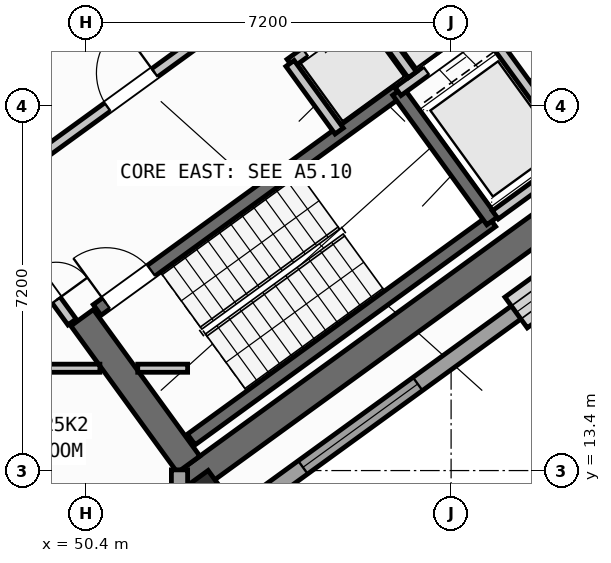
"""IFC4 building model, lengths in metres.
Left out: names, types, materials, properties, quantities, classifications, styles, units other than length and angle.
Written with IfcOpenShell. Run it as: python <this file> out.ifc"""

import sys

from ifc_helpers import new_model, si_unit, direction, frame, frame_2d, origin, origin_2d, place, context, subcontext, project, spatial, rectangle, hollow_rectangle, extrude, source, transform, mapped, element, fill, save


model = new_model("IFC4")
c1 = context("Model", 3, precision=1e-05, world=origin(), true_north=direction((0.0, 1.0)))
c2 = subcontext(c1, "Body", "Model", "MODEL_VIEW")
j1 = project(units=[si_unit("LENGTHUNIT", "METRE"), si_unit("PLANEANGLEUNIT", "RADIAN")], contexts=[c1])
p1 = place(None, origin())
s1 = spatial("IfcSite", under=j1, at=p1, CompositionType="ELEMENT")
p2 = place(p1, origin())
s2 = spatial("IfcBuilding", under=s1, at=p2, CompositionType="ELEMENT")
p3 = place(p2, frame((0.0, 0.0, 100.8)))
s3 = spatial("IfcBuildingStorey", under=s2, at=p3, CompositionType="ELEMENT", Elevation=100.8)
p4 = place(p3, frame((52.359, 13.14, 0.0), z_axis=(0.0, 0.0, 1.0), x_axis=(0.809014896919, 0.587788139183, 0.0)))
e1 = element("IfcWall", 1, at=p4, inside=s3, PredefinedType="SHEAR", context=c2, shape_type="SweptSolid", body=[
    extrude(rectangle(XDim=12.34, YDim=0.55, at=frame_2d((6.17, 0.0))), origin(), (0.0, 0.0, 1.0), 4.25),
])
p5 = place(p3, frame((52.42, 13.524, 0.0), z_axis=(0.0, 0.0, 1.0), x_axis=(-0.587802113096, 0.809004744015, 0.0)))
e2 = element("IfcWall", 2, at=p5, inside=s3, PredefinedType="SHEAR", context=c2, shape_type="SweptSolid", body=[
    extrude(rectangle(XDim=3.575, YDim=0.55, at=frame_2d((1.788, 0.0))), origin(), (0.0, 0.0, 1.0), 4.25),
])
m1 = source(origin(), c2, "Body", "SweptSolid", [
    extrude(hollow_rectangle(XDim=0.9, YDim=0.9, WallThickness=0.036, at=origin_2d()), origin(), (0.0, 0.0, 1.0), 4.5),
])
p6 = place(p3, frame((52.705, 12.773, 0.0), z_axis=(0.0, 0.0, 1.0), x_axis=(0.809016994375, 0.587785252292, 0.0)))
e3 = element("IfcColumn", 3, at=p6, inside=s3, PredefinedType="COLUMN", context=c2, shape_type="MappedRepresentation", body=[
    mapped(m1, transform((0.0, 0.0, 0.0), scale=1.0)),
])
p7 = place(p3, frame((67.454, 22.747, 0.0), z_axis=(0.0, 0.0, 1.0), x_axis=(-0.809021120468, -0.587779573171, 0.0)))
e4 = element("IfcWall", 4, at=p7, inside=s3, PredefinedType="STANDARD", context=c2, shape_type="SweptSolid", body=[
    extrude(rectangle(XDim=17.588, YDim=0.32, at=frame_2d((8.794, 0.0))), origin(), (0.0, 0.0, 1.0), 4.25),
])
p8 = place(p7, frame((1.624, 0.0, 0.0)))
e5 = element("IfcOpeningElement", 5, at=p8, cuts=e4, PredefinedType="OPENING", context=c2, shape_type="SweptSolid", body=[
    extrude(rectangle(XDim=1.05, YDim=2.15, at=frame_2d((0.525, 1.075))), frame((0.0, 0.17, 0.0), z_axis=(0.0, -1.0, 0.0), x_axis=(1.0, 0.0, 0.0)), (0.0, 0.0, 1.0), 0.34),
])
p9 = place(p7, frame((7.794, 0.0, 0.65)))
e6 = element("IfcOpeningElement", 6, at=p9, cuts=e4, PredefinedType="OPENING", context=c2, shape_type="SweptSolid", body=[
    extrude(rectangle(XDim=2.8, YDim=2.1, at=frame_2d((1.4, 1.05))), frame((0.0, 0.17, 0.0), z_axis=(0.0, -1.0, 0.0), x_axis=(1.0, 0.0, 0.0)), (0.0, 0.0, 1.0), 0.34),
])
p10 = place(p7, frame((12.994, 0.0, 0.65)))
e7 = element("IfcOpeningElement", 7, at=p10, cuts=e4, PredefinedType="OPENING", context=c2, shape_type="SweptSolid", body=[
    extrude(rectangle(XDim=2.8, YDim=2.1, at=frame_2d((1.4, 1.05))), frame((0.0, 0.17, 0.0), z_axis=(0.0, -1.0, 0.0), x_axis=(1.0, 0.0, 0.0)), (0.0, 0.0, 1.0), 0.34),
])
p11 = place(p3, frame((52.24, 13.414, 0.0), z_axis=(0.0, 0.0, 1.0), x_axis=(0.0, -1.0, 0.0)))
e8 = element("IfcWall", 8, at=p11, inside=s3, PredefinedType="STANDARD", context=c2, shape_type="SweptSolid", body=[
    extrude(rectangle(XDim=9.948, YDim=0.32, at=frame_2d((4.974, 0.0))), origin(), (0.0, 0.0, 1.0), 4.25),
])
p12 = place(p11, frame((1.96, 0.0, 0.65)))
e9 = element("IfcOpeningElement", 9, at=p12, cuts=e8, PredefinedType="OPENING", context=c2, shape_type="SweptSolid", body=[
    extrude(rectangle(XDim=2.8, YDim=2.1, at=frame_2d((1.4, 1.05))), frame((0.0, 0.17, 0.0), z_axis=(0.0, -1.0, 0.0), x_axis=(1.0, 0.0, 0.0)), (0.0, 0.0, 1.0), 0.34),
])
p13 = place(p11, frame((6.883, 0.0, 0.8)))
e10 = element("IfcOpeningElement", 10, at=p13, cuts=e8, PredefinedType="OPENING", context=c2, shape_type="SweptSolid", body=[
    extrude(rectangle(XDim=2.1, YDim=1.55, at=frame_2d((1.05, 0.775))), frame((0.0, 0.17, 0.0), z_axis=(0.0, -1.0, 0.0), x_axis=(1.0, 0.0, 0.0)), (0.0, 0.0, 1.0), 0.34),
])
p14 = place(p3, frame((52.472, 14.013, 0.0), z_axis=(0.0, 0.0, 1.0), x_axis=(0.809028366311, 0.587769599847, 0.0)))
e11 = element("IfcWall", 11, at=p14, inside=s3, PredefinedType="SHEAR", context=c2, shape_type="SweptSolid", body=[
    extrude(rectangle(XDim=7.33, YDim=0.26, at=frame_2d((3.665, 0.0))), origin(), (0.0, 0.0, 1.0), 4.25),
])
p15 = place(p3, frame((50.615, 16.57, 0.0), z_axis=(0.0, 0.0, 1.0), x_axis=(0.809028366311, 0.587769599847, 0.0)))
e12 = element("IfcWall", 12, at=p15, inside=s3, PredefinedType="SHEAR", context=c2, shape_type="SweptSolid", body=[
    extrude(rectangle(XDim=7.33, YDim=0.26, at=frame_2d((3.665, 0.0))), origin(), (0.0, 0.0, 1.0), 4.25),
])
p16 = place(p15, frame((0.22, 0.0, 0.0)))
e13 = element("IfcOpeningElement", 13, at=p16, cuts=e12, PredefinedType="OPENING", context=c2, shape_type="SweptSolid", body=[
    extrude(rectangle(XDim=1.1, YDim=2.1, at=frame_2d((0.55, 1.05))), frame((0.0, 0.14, 0.0), z_axis=(0.0, -1.0, 0.0), x_axis=(1.0, 0.0, 0.0)), (0.0, 0.0, 1.0), 0.28),
])
p17 = place(p3, frame((58.41, 18.327, 0.0), z_axis=(0.0, 0.0, 1.0), x_axis=(-0.58776738483, 0.809029975545, 0.0)))
e14 = element("IfcWall", 14, at=p17, inside=s3, PredefinedType="SHEAR", context=c2, shape_type="SweptSolid", body=[
    extrude(rectangle(XDim=3.16, YDim=0.26, at=frame_2d((1.58, 0.0))), origin(), (0.0, 0.0, 1.0), 4.25),
])
p18 = place(p3, frame((47.065, 21.407, 0.0), z_axis=(0.0, 0.0, 1.0), x_axis=(0.809032984992, 0.587763242466, 0.0)))
e15 = element("IfcWall", 15, at=p18, inside=s3, PredefinedType="STANDARD", context=c2, shape_type="SweptSolid", body=[
    extrude(rectangle(XDim=3.448, YDim=0.2, at=frame_2d((1.724, 0.0))), origin(), (0.0, 0.0, 1.0), 4.24),
])
p19 = place(p18, frame((0.458, 0.0, 0.0)))
e16 = element("IfcOpeningElement", 16, at=p19, cuts=e15, PredefinedType="OPENING", context=c2, shape_type="SweptSolid", body=[
    extrude(rectangle(XDim=1.3, YDim=2.2, at=frame_2d((0.65, 1.1))), frame((0.0, 0.11, 0.0), z_axis=(0.0, -1.0, 0.0), x_axis=(1.0, 0.0, 0.0)), (0.0, 0.0, 1.0), 0.22),
])
p20 = place(p3, frame((48.758, 19.077, 0.0), z_axis=(0.0, 0.0, 1.0), x_axis=(0.809005065155, 0.587801671104, 0.0)))
e17 = element("IfcWall", 17, at=p20, inside=s3, PredefinedType="STANDARD", context=c2, shape_type="SweptSolid", body=[
    extrude(rectangle(XDim=5.768, YDim=0.2, at=frame_2d((2.884, 0.0))), origin(), (0.0, 0.0, 1.0), 4.24),
])
p21 = place(p20, frame((2.548, 0.0, 0.0)))
e18 = element("IfcOpeningElement", 18, at=p21, cuts=e17, PredefinedType="OPENING", context=c2, shape_type="SweptSolid", body=[
    extrude(rectangle(XDim=1.15, YDim=2.1, at=frame_2d((0.575, 1.05))), frame((0.0, 0.11, 0.0), z_axis=(0.0, -1.0, 0.0), x_axis=(1.0, 0.0, 0.0)), (0.0, 0.0, 1.0), 0.22),
])
p22 = place(p3, frame((56.553, 20.884, 0.0), z_axis=(0.0, 0.0, 1.0), x_axis=(0.809023564264, 0.58777620951, 0.0)))
e19 = element("IfcWall", 19, at=p22, inside=s3, PredefinedType="STANDARD", context=c2, shape_type="SweptSolid", body=[
    extrude(rectangle(XDim=3.818, YDim=0.2, at=frame_2d((1.909, 0.0))), origin(), (0.0, 0.0, 1.0), 4.24),
])
p23 = place(p22, frame((0.69, 0.0, 0.0)))
e20 = element("IfcOpeningElement", 20, at=p23, cuts=e19, PredefinedType="OPENING", context=c2, shape_type="SweptSolid", body=[
    extrude(rectangle(XDim=1.1, YDim=2.15, at=frame_2d((0.55, 1.075))), frame((0.0, 0.11, 0.0), z_axis=(0.0, -1.0, 0.0), x_axis=(1.0, 0.0, 0.0)), (0.0, 0.0, 1.0), 0.22),
])
p24 = place(p22, frame((2.65, 0.0, 0.0)))
e21 = element("IfcOpeningElement", 21, at=p24, cuts=e19, PredefinedType="OPENING", context=c2, shape_type="SweptSolid", body=[
    extrude(rectangle(XDim=0.86, YDim=2.05, at=frame_2d((0.43, 1.025))), frame((0.0, 0.11, 0.0), z_axis=(0.0, -1.0, 0.0), x_axis=(1.0, 0.0, 0.0)), (0.0, 0.0, 1.0), 0.22),
])
p25 = place(p3, frame((54.421, 21.436, 0.0), z_axis=(0.0, 0.0, 1.0), x_axis=(0.809013710463, 0.587789772183, 0.0)))
e22 = element("IfcWall", 22, at=p25, inside=s3, PredefinedType="STANDARD", context=c2, shape_type="SweptSolid", body=[
    extrude(rectangle(XDim=5.36, YDim=0.2, at=frame_2d((2.68, 0.0))), origin(), (0.0, 0.0, 1.0), 4.24),
])
p26 = place(p25, frame((0.37, 0.0, 0.0)))
e23 = element("IfcOpeningElement", 23, at=p26, cuts=e22, PredefinedType="OPENING", context=c2, shape_type="SweptSolid", body=[
    extrude(rectangle(XDim=1.1, YDim=2.15, at=frame_2d((0.55, 1.075))), frame((0.0, 0.11, 0.0), z_axis=(0.0, -1.0, 0.0), x_axis=(1.0, 0.0, 0.0)), (0.0, 0.0, 1.0), 0.22),
])
p27 = place(p25, frame((2.17, 0.0, 0.0)))
e24 = element("IfcOpeningElement", 24, at=p27, cuts=e22, PredefinedType="OPENING", context=c2, shape_type="SweptSolid", body=[
    extrude(rectangle(XDim=1.1, YDim=2.15, at=frame_2d((0.55, 1.075))), frame((0.0, 0.11, 0.0), z_axis=(0.0, -1.0, 0.0), x_axis=(1.0, 0.0, 0.0)), (0.0, 0.0, 1.0), 0.22),
])
p28 = place(p25, frame((3.97, 0.0, 0.0)))
e25 = element("IfcOpeningElement", 25, at=p28, cuts=e22, PredefinedType="OPENING", context=c2, shape_type="SweptSolid", body=[
    extrude(rectangle(XDim=1.1, YDim=2.15, at=frame_2d((0.55, 1.075))), frame((0.0, 0.11, 0.0), z_axis=(0.0, -1.0, 0.0), x_axis=(1.0, 0.0, 0.0)), (0.0, 0.0, 1.0), 0.22),
])
p29 = place(p3, frame((55.391, 20.102, 0.0), z_axis=(0.0, 0.0, 1.0), x_axis=(-0.58778447739, 0.809017557374, 0.0)))
e26 = element("IfcWall", 26, at=p29, inside=s3, PredefinedType="STANDARD", context=c2, shape_type="SweptSolid", body=[
    extrude(rectangle(XDim=1.65, YDim=0.2, at=frame_2d((0.825, 0.0))), origin(), (0.0, 0.0, 1.0), 4.24),
])
p30 = place(p3, frame((56.834, 21.212, 0.0), z_axis=(0.0, 0.0, 1.0), x_axis=(-0.58776738483, 0.809029975545, 0.0)))
e27 = element("IfcWall", 27, at=p30, inside=s3, PredefinedType="STANDARD", context=c2, shape_type="SweptSolid", body=[
    extrude(rectangle(XDim=1.58, YDim=0.2, at=frame_2d((0.79, 0.0))), origin(), (0.0, 0.0, 1.0), 4.24),
])
p31 = place(p3, frame((60.067, 19.655, 0.0), z_axis=(0.0, 0.0, 1.0), x_axis=(-0.587800520745, 0.809005900975, 0.0)))
e28 = element("IfcWall", 28, at=p31, inside=s3, PredefinedType="STANDARD", context=c2, shape_type="SweptSolid", body=[
    extrude(rectangle(XDim=2.66, YDim=0.2, at=frame_2d((1.33, 0.0))), origin(), (0.0, 0.0, 1.0), 4.24),
])
p32 = place(p3, frame((58.472, 18.447, 0.0), z_axis=(0.0, 0.0, 1.0), x_axis=(0.809018631237, 0.587782999339, 0.0)))
e29 = element("IfcWall", 29, at=p32, inside=s3, PredefinedType="STANDARD", context=c2, shape_type="SweptSolid", body=[
    extrude(rectangle(XDim=3.698, YDim=0.2, at=frame_2d((1.849, 0.0))), origin(), (0.0, 0.0, 1.0), 4.24),
])
p33 = place(p3, frame((35.237, 15.42, 0.0), z_axis=(0.0, 0.0, 1.0), x_axis=(1.0, 0.0, 0.0)))
e30 = element("IfcWall", 30, at=p33, inside=s3, PredefinedType="PARTITIONING", context=c2, shape_type="SweptSolid", body=[
    extrude(rectangle(XDim=15.432, YDim=0.16, at=frame_2d((7.716, 0.0))), origin(), (0.0, 0.0, 1.0), 4.24),
])
p34 = place(p33, frame((0.969, 0.0, 0.0)))
e31 = element("IfcOpeningElement", 31, at=p34, cuts=e30, PredefinedType="OPENING", context=c2, shape_type="SweptSolid", body=[
    extrude(rectangle(XDim=1.0, YDim=2.1, at=frame_2d((0.5, 1.05))), frame((0.0, 0.09, 0.0), z_axis=(0.0, -1.0, 0.0), x_axis=(1.0, 0.0, 0.0)), (0.0, 0.0, 1.0), 0.18),
])
p35 = place(p33, frame((8.799, 0.0, 0.0)))
e32 = element("IfcOpeningElement", 32, at=p35, cuts=e30, PredefinedType="OPENING", context=c2, shape_type="SweptSolid", body=[
    extrude(rectangle(XDim=1.0, YDim=2.1, at=frame_2d((0.5, 1.05))), frame((0.0, 0.09, 0.0), z_axis=(0.0, -1.0, 0.0), x_axis=(1.0, 0.0, 0.0)), (0.0, 0.0, 1.0), 0.18),
])
p36 = place(p3, frame((51.416, 15.42, 0.0), z_axis=(0.0, 0.0, 1.0), x_axis=(1.0, 0.0, 0.0)))
e33 = element("IfcWall", 33, at=p36, inside=s3, PredefinedType="PARTITIONING", context=c2, shape_type="SweptSolid", body=[
    extrude(rectangle(XDim=0.984, YDim=0.16, at=frame_2d((0.492, 0.0))), origin(), (0.0, 0.0, 1.0), 4.24),
])
p37 = place(p3, frame((50.119, 16.333, 0.0), z_axis=(0.0, 0.0, 1.0), x_axis=(-0.587749856981, 0.809042709391, 0.0)))
e34 = element("IfcWall", 34, at=p37, inside=s3, PredefinedType="STANDARD", context=c2, shape_type="SweptSolid", body=[
    extrude(rectangle(XDim=2.96, YDim=0.2, at=frame_2d((1.48, 0.0))), origin(), (0.0, 0.0, 1.0), 4.24),
])
p38 = place(p37, frame((0.53, 0.0, 0.0)))
e35 = element("IfcOpeningElement", 35, at=p38, cuts=e34, PredefinedType="OPENING", context=c2, shape_type="SweptSolid", body=[
    extrude(rectangle(XDim=1.5, YDim=2.15, at=frame_2d((0.75, 1.075))), frame((0.0, 0.11, 0.0), z_axis=(0.0, -1.0, 0.0), x_axis=(1.0, 0.0, 0.0)), (0.0, 0.0, 1.0), 0.22),
])
m2 = source(origin(), c2, "Body", "SweptSolid", [
    extrude(rectangle(XDim=2.8, YDim=2.1, at=frame_2d((1.4, 1.05))), frame((0.0, 0.03, 0.0), z_axis=(0.0, -1.0, 0.0), x_axis=(1.0, 0.0, 0.0)), (0.0, 0.0, 1.0), 0.06),
])
p39 = place(p9, origin())
e36 = element("IfcWindow", 36, at=p39, inside=s3, PartitioningType="SINGLE_PANEL", PredefinedType="WINDOW", context=c2, shape_type="MappedRepresentation", body=[
    mapped(m2, transform((0.0, 0.0, 0.0), scale=1.0)),
])
fill(e6, e36)
p40 = place(p10, origin())
e37 = element("IfcWindow", 37, at=p40, inside=s3, PartitioningType="SINGLE_PANEL", PredefinedType="WINDOW", context=c2, shape_type="MappedRepresentation", body=[
    mapped(m2, transform((0.0, 0.0, 0.0), scale=1.0)),
])
fill(e7, e37)
m3 = source(origin(), c2, "Body", "SweptSolid", [
    extrude(rectangle(XDim=1.1, YDim=2.1, at=frame_2d((0.55, 1.05))), frame((0.0, 0.025, 0.0), z_axis=(0.0, -1.0, 0.0), x_axis=(1.0, 0.0, 0.0)), (0.0, 0.0, 1.0), 0.05),
])
p41 = place(p16, origin())
e38 = element("IfcDoor", 38, at=p41, inside=s3, OperationType="SINGLE_SWING_LEFT", PredefinedType="DOOR", context=c2, shape_type="MappedRepresentation", body=[
    mapped(m3, transform((0.0, 0.0, 0.0), scale=1.0)),
])
fill(e13, e38)
m4 = source(origin(), c2, "Body", "SweptSolid", [
    extrude(rectangle(XDim=1.15, YDim=2.1, at=frame_2d((0.575, 1.05))), frame((0.0, 0.025, 0.0), z_axis=(0.0, -1.0, 0.0), x_axis=(1.0, 0.0, 0.0)), (0.0, 0.0, 1.0), 0.05),
])
p42 = place(p21, origin())
e39 = element("IfcDoor", 39, at=p42, inside=s3, OperationType="SINGLE_SWING_RIGHT", PredefinedType="DOOR", context=c2, shape_type="MappedRepresentation", body=[
    mapped(m4, transform((0.0, 0.0, 0.0), scale=1.0)),
])
fill(e18, e39)
m5 = source(origin(), c2, "Body", "SweptSolid", [
    extrude(rectangle(XDim=1.1, YDim=2.15, at=frame_2d((0.55, 1.075))), frame((0.0, 0.025, 0.0), z_axis=(0.0, -1.0, 0.0), x_axis=(1.0, 0.0, 0.0)), (0.0, 0.0, 1.0), 0.05),
])
p43 = place(p26, origin())
e40 = element("IfcDoor", 40, at=p43, inside=s3, OperationType="DOUBLE_DOOR_SLIDING", PredefinedType="DOOR", context=c2, shape_type="MappedRepresentation", body=[
    mapped(m5, transform((0.0, 0.0, 0.0), scale=1.0)),
])
fill(e23, e40)
p44 = place(p23, origin())
e41 = element("IfcDoor", 41, at=p44, inside=s3, OperationType="DOUBLE_DOOR_SLIDING", PredefinedType="DOOR", context=c2, shape_type="MappedRepresentation", body=[
    mapped(m5, transform((0.0, 0.0, 0.0), scale=1.0)),
])
fill(e20, e41)
m6 = source(origin(), c2, "Body", "SweptSolid", [
    extrude(rectangle(XDim=1.5, YDim=2.15, at=frame_2d((0.75, 1.075))), frame((0.0, 0.025, 0.0), z_axis=(0.0, -1.0, 0.0), x_axis=(1.0, 0.0, 0.0)), (0.0, 0.0, 1.0), 0.05),
])
p45 = place(p38, frame((1.5, 0.0, 0.0), z_axis=(0.0, 0.0, 1.0), x_axis=(-1.0, 0.0, 0.0)))
e42 = element("IfcDoor", 42, at=p45, inside=s3, OperationType="DOUBLE_DOOR_SINGLE_SWING", PredefinedType="DOOR", context=c2, shape_type="MappedRepresentation", body=[
    mapped(m6, transform((0.0, 0.0, 0.0), scale=1.0)),
])
fill(e35, e42)
save(model, sys.argv[1])
